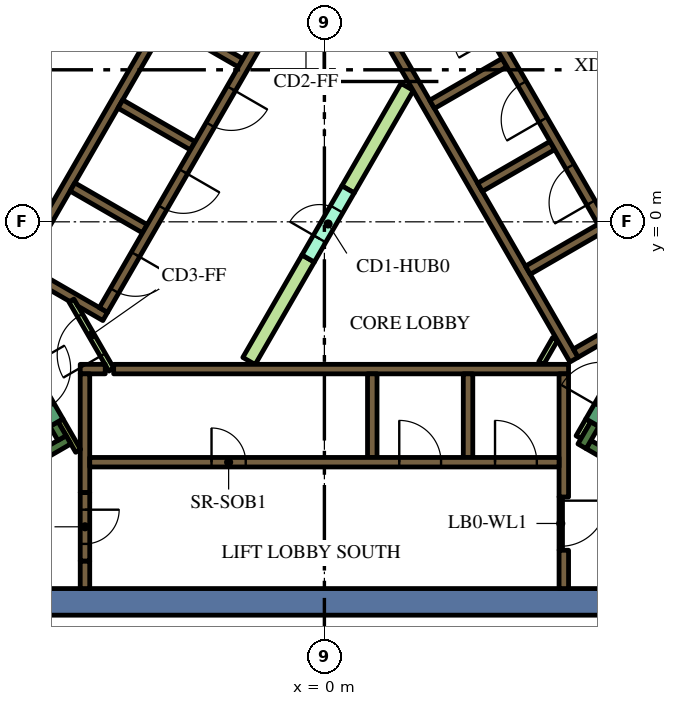
"""IFC4 building model, lengths in metres.
Left out: names, types, materials, properties, quantities, classifications, styles, units other than length and angle.
Written with IfcOpenShell. Run it as: python <this file> out.ifc"""

import sys

from ifc_helpers import new_model, si_unit, direction, frame, frame_2d, origin, place, context, subcontext, project, spatial, polyline, rectangle, outline, extrude, element, fill, save


model = new_model("IFC4")
c1 = context("Model", 3, precision=1e-05, world=origin(), true_north=direction((0.0, 1.0)))
c2 = subcontext(c1, "Body", "Model", "MODEL_VIEW")
j1 = project(units=[si_unit("LENGTHUNIT", "METRE"), si_unit("PLANEANGLEUNIT", "RADIAN")], contexts=[c1])
p1 = place(None, origin())
s1 = spatial("IfcSite", under=j1, at=p1, CompositionType="ELEMENT")
p2 = place(p1, origin())
s2 = spatial("IfcBuilding", under=s1, at=p2, CompositionType="ELEMENT")
p3 = place(p2, frame((0.0, 0.0, 261.6)))
s3 = spatial("IfcBuildingStorey", under=s2, at=p3, CompositionType="ELEMENT", Elevation=261.6)
p4 = place(p3, frame((8.904, -10.0, 0.0), z_axis=(0.0, 0.0, 1.0), x_axis=(-1.0, 0.0, 0.0)))
e1 = element("IfcWall", 1, at=p4, inside=s3, PredefinedType="SOLIDWALL", context=c2, shape_type="SweptSolid", body=[
    extrude(rectangle(XDim=22.226, YDim=0.7, at=frame_2d((11.113, 0.0))), origin(), (0.0, 0.0, 1.0), 5.4),
])
p5 = place(p3, frame((-12.625, -1.867, 0.0), z_axis=(0.0, 0.0, 1.0), x_axis=(0.499996974394, 0.866027150612, 0.0)))
e2 = element("IfcWall", 2, at=p5, inside=s3, PredefinedType="SOLIDWALL", context=c2, shape_type="SweptSolid", body=[
    extrude(rectangle(XDim=15.858, YDim=0.7, at=frame_2d((7.929, 0.0))), origin(), (0.0, 0.0, 1.0), 5.4),
])
p6 = place(p3, frame((12.84, -9.261, 0.0), z_axis=(0.0, 0.0, 1.0), x_axis=(-0.866013990052, 0.500019768644, 0.0)))
e3 = element("IfcWall", 3, at=p6, inside=s3, PredefinedType="SOLIDWALL", context=c2, shape_type="SweptSolid", body=[
    extrude(rectangle(XDim=6.8, YDim=0.25, at=frame_2d((3.4, 0.0))), origin(), (0.0, 0.0, 1.0), 5.4),
])
p7 = place(p3, frame((6.78, -5.906, 0.0), z_axis=(0.0, 0.0, 1.0), x_axis=(0.500223362819, 0.865896406789, 0.0)))
e4 = element("IfcWall", 4, at=p7, inside=s3, PredefinedType="SOLIDWALL", context=c2, shape_type="SweptSolid", body=[
    extrude(rectangle(XDim=0.675, YDim=0.25, at=frame_2d((0.337, 0.0))), origin(), (0.0, 0.0, 1.0), 5.4),
])
p8 = place(p3, frame((-12.84, -9.261, 0.0), z_axis=(0.0, 0.0, 1.0), x_axis=(0.866016039709, 0.500016218704, 0.0)))
e5 = element("IfcWall", 5, at=p8, inside=s3, PredefinedType="SOLIDWALL", context=c2, shape_type="SweptSolid", body=[
    extrude(rectangle(XDim=7.05, YDim=0.25, at=frame_2d((3.525, 0.0))), origin(), (0.0, 0.0, 1.0), 5.4),
])
p9 = place(p3, frame((-6.905, -5.69, 0.0), z_axis=(0.0, 0.0, 1.0), x_axis=(-0.500402024738, 0.865793170242, 0.0)))
e6 = element("IfcWall", 6, at=p9, inside=s3, PredefinedType="SOLIDWALL", context=c2, shape_type="SweptSolid", body=[
    extrude(rectangle(XDim=0.425, YDim=0.25, at=frame_2d((0.212, 0.0))), origin(), (0.0, 0.0, 1.0), 5.4),
])
p10 = place(p3, frame((-5.545, -3.875, 0.0), z_axis=(0.0, 0.0, 1.0), x_axis=(1.0, 0.0, 0.0)))
e7 = element("IfcWall", 7, at=p10, inside=s3, PredefinedType="SOLIDWALL", context=c2, shape_type="SweptSolid", body=[
    extrude(rectangle(XDim=11.97, YDim=0.25, at=frame_2d((5.985, 0.0))), origin(), (0.0, 0.0, 1.0), 5.4),
])
p11 = place(p3, frame((-6.425, -3.875, 0.0), z_axis=(0.0, 0.0, 1.0), x_axis=(1.0, 0.0, 0.0)))
e8 = element("IfcWall", 8, at=p11, inside=s3, PredefinedType="SOLIDWALL", context=c2, shape_type="SweptSolid", body=[
    extrude(rectangle(XDim=0.658, YDim=0.25, at=frame_2d((0.329, 0.0))), origin(), (0.0, 0.0, 1.0), 5.4),
])
p12 = place(p3, frame((6.3, -7.24, 0.0), z_axis=(0.0, 0.0, 1.0), x_axis=(0.0, 1.0, 0.0)))
e9 = element("IfcWall", 9, at=p12, inside=s3, PredefinedType="SOLIDWALL", context=c2, shape_type="SweptSolid", body=[
    extrude(rectangle(XDim=3.24, YDim=0.25, at=frame_2d((1.62, 0.0))), origin(), (0.0, 0.0, 1.0), 5.4),
])
p13 = place(p3, frame((6.3, -9.65, 0.0), z_axis=(0.0, 0.0, 1.0), x_axis=(0.0, 1.0, 0.0)))
e10 = element("IfcWall", 10, at=p13, inside=s3, PredefinedType="SOLIDWALL", context=c2, shape_type="SweptSolid", body=[
    extrude(rectangle(XDim=1.008, YDim=0.25, at=frame_2d((0.504, 0.0))), origin(), (0.0, 0.0, 1.0), 5.4),
])
for number, where, z_axis, x_axis in (
    (11, (3.78, -4.0, 0.0), (0.0, 0.0, 1.0), (0.0, -1.0, 0.0)),
    (12, (1.26, -4.0, 0.0), (0.0, 0.0, 1.0), (0.0, -1.0, 0.0)),
):
    element("IfcWall", number, at=place(p3, frame(where, z_axis=z_axis, x_axis=x_axis)), inside=s3, PredefinedType="SOLIDWALL", context=c2, shape_type="SweptSolid", body=[
        extrude(rectangle(XDim=2.2, YDim=0.25, at=frame_2d((1.1, 0.0))), origin(), (0.0, 0.0, 1.0), 5.4),
    ])
p14 = place(p3, frame((-6.3, -7.125, 0.0), z_axis=(0.0, 0.0, 1.0), x_axis=(0.0, 1.0, 0.0)))
e13 = element("IfcWall", 13, at=p14, inside=s3, PredefinedType="SOLIDWALL", context=c2, shape_type="SweptSolid", body=[
    extrude(rectangle(XDim=3.125, YDim=0.25, at=frame_2d((1.562, 0.0))), origin(), (0.0, 0.0, 1.0), 5.4),
])
p15 = place(p3, frame((-6.3, -8.925, 0.0), z_axis=(0.0, 0.0, 1.0), x_axis=(0.0, -1.0, 0.0)))
e14 = element("IfcWall", 14, at=p15, inside=s3, PredefinedType="SOLIDWALL", context=c2, shape_type="SweptSolid", body=[
    extrude(rectangle(XDim=0.725, YDim=0.25, at=frame_2d((0.363, 0.0))), origin(), (0.0, 0.0, 1.0), 5.4),
])
p16 = place(p3, frame((6.568, -3.627, 0.0), z_axis=(0.0, 0.0, 1.0), x_axis=(-0.499999455981, 0.866025717874, 0.0)))
e15 = element("IfcWall", 15, at=p16, inside=s3, PredefinedType="SOLIDWALL", context=c2, shape_type="SweptSolid", body=[
    extrude(rectangle(XDim=11.978, YDim=0.25, at=frame_2d((5.989, 0.0))), origin(), (0.0, 0.0, 1.0), 5.4),
])
for number, where, z_axis, x_axis in (
    (16, (2.834, 3.091, 0.0), (0.0, 0.0, 1.0), (0.866, 0.5, 0.0)),
    (17, (4.094, 0.909, 0.0), (0.0, 0.0, 1.0), (0.866, 0.5, 0.0)),
    (18, (5.354, -1.274, 0.0), (0.0, 0.0, 1.0), (0.866, 0.5, 0.0)),
):
    element("IfcWall", number, at=place(p3, frame(where, z_axis=z_axis, x_axis=x_axis)), inside=s3, PredefinedType="SOLIDWALL", context=c2, shape_type="SweptSolid", body=[
        extrude(rectangle(XDim=2.2, YDim=0.25, at=frame_2d((1.1, 0.0))), origin(), (0.0, 0.0, 1.0), 5.4),
    ])
p17 = place(p3, frame((6.614, -3.456, 0.0), z_axis=(0.0, 0.0, 1.0), x_axis=(0.866032512851, 0.499987686533, 0.0)))
e19 = element("IfcWall", 19, at=p17, inside=s3, PredefinedType="SOLIDWALL", context=c2, shape_type="SweptSolid", body=[
    extrude(rectangle(XDim=2.975, YDim=0.25, at=frame_2d((1.487, 0.0))), origin(), (0.0, 0.0, 1.0), 5.4),
])
p18 = place(p3, frame((-8.06, -1.311, 0.0), z_axis=(0.0, 0.0, 1.0), x_axis=(0.50000273126, 0.866023826885, 0.0)))
e20 = element("IfcWall", 20, at=p18, inside=s3, PredefinedType="SOLIDWALL", context=c2, shape_type="SweptSolid", body=[
    extrude(rectangle(XDim=10.33, YDim=0.25, at=frame_2d((5.165, 0.0))), origin(), (0.0, 0.0, 1.0), 5.4),
])
for number, where, z_axis, x_axis in (
    (21, (-2.204, 4.182, 0.0), (0.0, 0.0, 1.0), (-0.866, 0.5, 0.0)),
    (22, (-5.369, 3.1, 0.0), (0.0, 0.0, 1.0), (0.866, -0.5, 0.0)),
    (23, (-4.724, -0.182, 0.0), (0.0, 0.0, 1.0), (-0.866, 0.5, 0.0)),
):
    element("IfcWall", number, at=place(p3, frame(where, z_axis=z_axis, x_axis=x_axis)), inside=s3, PredefinedType="SOLIDWALL", context=c2, shape_type="SweptSolid", body=[
        extrude(rectangle(XDim=2.2, YDim=0.25, at=frame_2d((1.1, 0.0))), origin(), (0.0, 0.0, 1.0), 5.4),
    ])
p19 = place(p3, origin())
e24 = element("IfcWall", 24, at=p19, inside=s3, PredefinedType="SOLIDWALL", context=c2, shape_type="SweptSolid", body=[
    extrude(outline(polyline([(-5.922, -2.257), (-5.922, -2.257), (-5.705, -2.382), (-5.83, -2.598), (-6.483, -2.221), (-6.591, -2.033), (-6.591, -2.033), (-6.7, -2.096), (-7.952, -1.373), (-7.827, -1.156), (-5.922, -2.257)])), origin(), (0.0, 0.0, 1.0), 5.4),
])
p20 = place(p3, frame((-6.48, -6.027, 0.0), z_axis=(0.0, 0.0, 1.0), x_axis=(-0.499927229454, 0.866067413802, 0.0)))
e25 = element("IfcWall", 25, at=p20, inside=s3, PredefinedType="PARTITIONING", context=c2, shape_type="SweptSolid", body=[
    extrude(rectangle(XDim=0.929, YDim=0.15, at=frame_2d((0.464, 0.0))), origin(), (0.0, 0.0, 1.0), 5.4),
])
p21 = place(p3, frame((6.945, -5.222, 0.0), z_axis=(0.0, 0.0, 1.0), x_axis=(-0.499818422106, -0.866130212453, 0.0)))
e26 = element("IfcWall", 26, at=p21, inside=s3, PredefinedType="PARTITIONING", context=c2, shape_type="SweptSolid", body=[
    extrude(rectangle(XDim=0.514, YDim=0.15, at=frame_2d((0.257, 0.0))), origin(), (0.0, 0.0, 1.0), 4.75),
])
p22 = place(p3, frame((5.705, -3.718, 0.0), z_axis=(0.0, 0.0, 1.0), x_axis=(0.499962090823, 0.866047289552, 0.0)))
e27 = element("IfcWall", 27, at=p22, inside=s3, PredefinedType="PARTITIONING", context=c2, shape_type="SweptSolid", body=[
    extrude(rectangle(XDim=0.735, YDim=0.15, at=frame_2d((0.367, 0.0))), origin(), (0.0, 0.0, 1.0), 4.75),
])
e28 = element("IfcWall", 28, at=p19, inside=s3, PredefinedType="PARTITIONING", context=c2, shape_type="SweptSolid", body=[
    extrude(outline(polyline([(2.017, 3.643), (2.342, 3.456), (0.785, 0.76), (0.46, 0.947), (2.017, 3.643)])), origin(), (0.0, 0.0, 1.0), 4.75),
])
e29 = element("IfcWall", 29, at=p19, inside=s3, PredefinedType="PARTITIONING", context=c2, shape_type="SweptSolid", body=[
    extrude(outline(polyline([(-0.59, -0.872), (-0.265, -1.059), (-1.822, -3.756), (-2.147, -3.568), (-0.59, -0.872)])), origin(), (0.0, 0.0, 1.0), 4.75),
])
p23 = place(p3, frame((-6.175, -6.325, 0.0), z_axis=(0.0, 0.0, 1.0), x_axis=(1.0, 0.0, 0.0)))
e30 = element("IfcWall", 30, at=p23, inside=s3, PredefinedType="SOLIDWALL", context=c2, shape_type="SweptSolid", body=[
    extrude(rectangle(XDim=12.35, YDim=0.25, at=frame_2d((6.175, 0.0))), origin(), (0.0, 0.0, 1.0), 5.4),
])
p24 = place(p23, frame((3.205, 0.0, 0.0)))
e31 = element("IfcOpeningElement", 31, at=p24, cuts=e30, PredefinedType="OPENING", context=c2, shape_type="SweptSolid", body=[
    extrude(rectangle(XDim=0.9, YDim=2.1, at=frame_2d((0.45, 1.05))), frame((0.0, 0.135, 0.0), z_axis=(0.0, -1.0, 0.0), x_axis=(1.0, 0.0, 0.0)), (0.0, 0.0, 1.0), 0.27),
])
p25 = place(p23, frame((8.145, 0.0, 0.0)))
e32 = element("IfcOpeningElement", 32, at=p25, cuts=e30, PredefinedType="OPENING", context=c2, shape_type="SweptSolid", body=[
    extrude(rectangle(XDim=1.1, YDim=2.1, at=frame_2d((0.55, 1.05))), frame((0.0, 0.135, 0.0), z_axis=(0.0, -1.0, 0.0), x_axis=(1.0, 0.0, 0.0)), (0.0, 0.0, 1.0), 0.27),
])
p26 = place(p23, frame((10.665, 0.0, 0.0)))
e33 = element("IfcOpeningElement", 33, at=p26, cuts=e30, PredefinedType="OPENING", context=c2, shape_type="SweptSolid", body=[
    extrude(rectangle(XDim=1.1, YDim=2.1, at=frame_2d((0.55, 1.05))), frame((0.0, 0.135, 0.0), z_axis=(0.0, -1.0, 0.0), x_axis=(1.0, 0.0, 0.0)), (0.0, 0.0, 1.0), 0.27),
])
p27 = place(p3, frame((8.565, -2.185, 0.0), z_axis=(0.0, 0.0, 1.0), x_axis=(-0.499997954832, 0.866026584559, 0.0)))
e34 = element("IfcWall", 34, at=p27, inside=s3, PredefinedType="SOLIDWALL", context=c2, shape_type="SweptSolid", body=[
    extrude(rectangle(XDim=12.35, YDim=0.25, at=frame_2d((6.175, 0.0))), origin(), (0.0, 0.0, 1.0), 5.4),
])
p28 = place(p27, frame((0.685, 0.0, 0.0)))
e35 = element("IfcOpeningElement", 35, at=p28, cuts=e34, PredefinedType="OPENING", context=c2, shape_type="SweptSolid", body=[
    extrude(rectangle(XDim=0.9, YDim=2.1, at=frame_2d((0.45, 1.05))), frame((0.0, 0.135, 0.0), z_axis=(0.0, -1.0, 0.0), x_axis=(1.0, 0.0, 0.0)), (0.0, 0.0, 1.0), 0.27),
])
p29 = place(p27, frame((3.105, 0.0, 0.0)))
e36 = element("IfcOpeningElement", 36, at=p29, cuts=e34, PredefinedType="OPENING", context=c2, shape_type="SweptSolid", body=[
    extrude(rectangle(XDim=1.1, YDim=2.1, at=frame_2d((0.55, 1.05))), frame((0.0, 0.135, 0.0), z_axis=(0.0, -1.0, 0.0), x_axis=(1.0, 0.0, 0.0)), (0.0, 0.0, 1.0), 0.27),
])
p30 = place(p27, frame((5.625, 0.0, 0.0)))
e37 = element("IfcOpeningElement", 37, at=p30, cuts=e34, PredefinedType="OPENING", context=c2, shape_type="SweptSolid", body=[
    extrude(rectangle(XDim=1.1, YDim=2.1, at=frame_2d((0.55, 1.05))), frame((0.0, 0.135, 0.0), z_axis=(0.0, -1.0, 0.0), x_axis=(1.0, 0.0, 0.0)), (0.0, 0.0, 1.0), 0.27),
])
p31 = place(p27, frame((8.145, 0.0, 0.0)))
e38 = element("IfcOpeningElement", 38, at=p31, cuts=e34, PredefinedType="OPENING", context=c2, shape_type="SweptSolid", body=[
    extrude(rectangle(XDim=1.1, YDim=2.1, at=frame_2d((0.55, 1.05))), frame((0.0, 0.135, 0.0), z_axis=(0.0, -1.0, 0.0), x_axis=(1.0, 0.0, 0.0)), (0.0, 0.0, 1.0), 0.27),
])
p32 = place(p27, frame((10.665, 0.0, 0.0)))
e39 = element("IfcOpeningElement", 39, at=p32, cuts=e34, PredefinedType="OPENING", context=c2, shape_type="SweptSolid", body=[
    extrude(rectangle(XDim=1.1, YDim=2.1, at=frame_2d((0.55, 1.05))), frame((0.0, 0.135, 0.0), z_axis=(0.0, -1.0, 0.0), x_axis=(1.0, 0.0, 0.0)), (0.0, 0.0, 1.0), 0.27),
])
p33 = place(p3, frame((-0.898, 6.194, 0.0), z_axis=(0.0, 0.0, 1.0), x_axis=(-0.499996202215, -0.866027596426, 0.0)))
e40 = element("IfcWall", 40, at=p33, inside=s3, PredefinedType="SOLIDWALL", context=c2, shape_type="SweptSolid", body=[
    extrude(rectangle(XDim=9.83, YDim=0.25, at=frame_2d((4.915, 0.0))), origin(), (0.0, 0.0, 1.0), 5.4),
])
p34 = place(p33, frame((0.585, 0.0, 0.0)))
e41 = element("IfcOpeningElement", 41, at=p34, cuts=e40, PredefinedType="OPENING", context=c2, shape_type="SweptSolid", body=[
    extrude(rectangle(XDim=1.1, YDim=2.1, at=frame_2d((0.55, 1.05))), frame((0.0, 0.135, 0.0), z_axis=(0.0, -1.0, 0.0), x_axis=(1.0, 0.0, 0.0)), (0.0, 0.0, 1.0), 0.27),
])
p35 = place(p33, frame((3.105, 0.0, 0.0)))
e42 = element("IfcOpeningElement", 42, at=p35, cuts=e40, PredefinedType="OPENING", context=c2, shape_type="SweptSolid", body=[
    extrude(rectangle(XDim=1.1, YDim=2.1, at=frame_2d((0.55, 1.05))), frame((0.0, 0.135, 0.0), z_axis=(0.0, -1.0, 0.0), x_axis=(1.0, 0.0, 0.0)), (0.0, 0.0, 1.0), 0.27),
])
p36 = place(p33, frame((5.625, 0.0, 0.0)))
e43 = element("IfcOpeningElement", 43, at=p36, cuts=e40, PredefinedType="OPENING", context=c2, shape_type="SweptSolid", body=[
    extrude(rectangle(XDim=1.1, YDim=2.1, at=frame_2d((0.55, 1.05))), frame((0.0, 0.135, 0.0), z_axis=(0.0, -1.0, 0.0), x_axis=(1.0, 0.0, 0.0)), (0.0, 0.0, 1.0), 0.27),
])
p37 = place(p33, frame((8.145, 0.0, 0.0)))
e44 = element("IfcOpeningElement", 44, at=p37, cuts=e40, PredefinedType="OPENING", context=c2, shape_type="SweptSolid", body=[
    extrude(rectangle(XDim=1.1, YDim=2.1, at=frame_2d((0.55, 1.05))), frame((0.0, 0.135, 0.0), z_axis=(0.0, -1.0, 0.0), x_axis=(1.0, 0.0, 0.0)), (0.0, 0.0, 1.0), 0.27),
])
p38 = place(p3, frame((7.053, -5.284, 0.0), z_axis=(0.0, 0.0, 1.0), x_axis=(0.500078061341, 0.865980330357, 0.0)))
e45 = element("IfcWall", 45, at=p38, inside=s3, PredefinedType="SOLIDWALL", context=c2, shape_type="SweptSolid", body=[
    extrude(rectangle(XDim=2.1, YDim=0.4, at=frame_2d((1.05, 0.0))), origin(), (0.0, 0.0, 1.0), 5.4),
])
p39 = place(p38, frame((0.45, 0.0, 0.0)))
e46 = element("IfcOpeningElement", 46, at=p39, cuts=e45, PredefinedType="OPENING", context=c2, shape_type="SweptSolid", body=[
    extrude(rectangle(XDim=1.2, YDim=2.1, at=frame_2d((0.6, 1.05))), frame((0.0, 0.21, 0.0), z_axis=(0.0, -1.0, 0.0), x_axis=(1.0, 0.0, 0.0)), (0.0, 0.0, 1.0), 0.42),
])
p40 = place(p3, frame((-8.103, -3.466, 0.0), z_axis=(0.0, 0.0, 1.0), x_axis=(0.500078061341, -0.865980330357, 0.0)))
e47 = element("IfcWall", 47, at=p40, inside=s3, PredefinedType="SOLIDWALL", context=c2, shape_type="SweptSolid", body=[
    extrude(rectangle(XDim=2.1, YDim=0.4, at=frame_2d((1.05, 0.0))), origin(), (0.0, 0.0, 1.0), 5.4),
])
p41 = place(p40, frame((0.45, 0.0, 0.0)))
e48 = element("IfcOpeningElement", 48, at=p41, cuts=e47, PredefinedType="OPENING", context=c2, shape_type="SweptSolid", body=[
    extrude(rectangle(XDim=1.2, YDim=2.1, at=frame_2d((0.6, 1.05))), frame((0.0, 0.21, 0.0), z_axis=(0.0, -1.0, 0.0), x_axis=(1.0, 0.0, 0.0)), (0.0, 0.0, 1.0), 0.42),
])
p42 = place(p3, frame((-6.3, -7.125, 0.0), z_axis=(0.0, 0.0, 1.0), x_axis=(0.0, -1.0, 0.0)))
e49 = element("IfcWall", 49, at=p42, inside=s3, PredefinedType="SOLIDWALL", context=c2, shape_type="SweptSolid", body=[
    extrude(rectangle(XDim=1.8, YDim=0.25, at=frame_2d((0.9, 0.0))), origin(), (0.0, 0.0, 1.0), 5.4),
])
p43 = place(p42, frame((0.45, 0.0, 0.0)))
e50 = element("IfcOpeningElement", 50, at=p43, cuts=e49, PredefinedType="OPENING", context=c2, shape_type="SweptSolid", body=[
    extrude(rectangle(XDim=0.9, YDim=2.1, at=frame_2d((0.45, 1.05))), frame((0.0, 0.135, 0.0), z_axis=(0.0, -1.0, 0.0), x_axis=(1.0, 0.0, 0.0)), (0.0, 0.0, 1.0), 0.27),
])
p44 = place(p3, frame((-0.427, -0.966, 0.0), z_axis=(0.0, 0.0, 1.0), x_axis=(0.49994051562, 0.866059744384, 0.0)))
e51 = element("IfcWall", 51, at=p44, inside=s3, PredefinedType="PARTITIONING", context=c2, shape_type="SweptSolid", body=[
    extrude(rectangle(XDim=2.1, YDim=0.375, at=frame_2d((1.05, 0.0))), origin(), (0.0, 0.0, 1.0), 4.75),
])
p45 = place(p44, frame((0.6, 0.0, 0.0)))
e52 = element("IfcOpeningElement", 52, at=p45, cuts=e51, PredefinedType="OPENING", context=c2, shape_type="SweptSolid", body=[
    extrude(rectangle(XDim=0.9, YDim=2.1, at=frame_2d((0.45, 1.05))), frame((0.0, 0.198, 0.0), z_axis=(0.0, -1.0, 0.0), x_axis=(1.0, 0.0, 0.0)), (0.0, 0.0, 1.0), 0.395),
])
p46 = place(p3, frame((-5.606, -3.89, 0.0), z_axis=(0.0, 0.0, 1.0), x_axis=(-0.500027713859, 0.866009402589, 0.0)))
e53 = element("IfcWall", 53, at=p46, inside=s3, PredefinedType="PARTITIONING", context=c2, shape_type="SweptSolid", body=[
    extrude(rectangle(XDim=2.1, YDim=0.15, at=frame_2d((1.05, 0.0))), origin(), (0.0, 0.0, 1.0), 4.75),
])
p47 = place(p46, frame((0.45, 0.0, 0.0)))
e54 = element("IfcOpeningElement", 54, at=p47, cuts=e53, PredefinedType="OPENING", context=c2, shape_type="SweptSolid", body=[
    extrude(rectangle(XDim=1.2, YDim=2.1, at=frame_2d((0.6, 1.05))), frame((0.0, 0.085, 0.0), z_axis=(0.0, -1.0, 0.0), x_axis=(1.0, 0.0, 0.0)), (0.0, 0.0, 1.0), 0.17),
])
p48 = place(p3, frame((6.22, -7.237, 0.0), z_axis=(0.0, 0.0, 1.0), x_axis=(0.0, -1.0, 0.0)))
e55 = element("IfcWall", 55, at=p48, inside=s3, PredefinedType="PARTITIONING", context=c2, shape_type="SweptSolid", body=[
    extrude(rectangle(XDim=1.4, YDim=0.09, at=frame_2d((0.7, 0.0))), origin(), (0.0, 0.0, 1.0), 4.75),
])
p49 = place(p48, frame((0.1, 0.0, 0.0)))
e56 = element("IfcOpeningElement", 56, at=p49, cuts=e55, PredefinedType="OPENING", context=c2, shape_type="SweptSolid", body=[
    extrude(rectangle(XDim=1.2, YDim=2.1, at=frame_2d((0.6, 1.05))), frame((0.0, 0.055, 0.0), z_axis=(0.0, -1.0, 0.0), x_axis=(1.0, 0.0, 0.0)), (0.0, 0.0, 1.0), 0.11),
])
p50 = place(p24, origin())
e57 = element("IfcDoor", 57, at=p50, inside=s3, OperationType="SINGLE_SWING_LEFT", PredefinedType="DOOR", context=c2, shape_type="SweptSolid", body=[
    extrude(rectangle(XDim=0.9, YDim=2.1, at=frame_2d((0.45, 1.05))), frame((0.0, 0.025, 0.0), z_axis=(0.0, -1.0, 0.0), x_axis=(1.0, 0.0, 0.0)), (0.0, 0.0, 1.0), 0.05),
])
fill(e31, e57)
p51 = place(p25, origin())
e58 = element("IfcDoor", 58, at=p51, inside=s3, OperationType="DOUBLE_DOOR_SLIDING", PredefinedType="DOOR", context=c2, shape_type="SweptSolid", body=[
    extrude(rectangle(XDim=1.1, YDim=2.1, at=frame_2d((0.55, 1.05))), frame((0.0, 0.025, 0.0), z_axis=(0.0, -1.0, 0.0), x_axis=(1.0, 0.0, 0.0)), (0.0, 0.0, 1.0), 0.05),
])
fill(e32, e58)
p52 = place(p26, origin())
e59 = element("IfcDoor", 59, at=p52, inside=s3, OperationType="DOUBLE_DOOR_SLIDING", PredefinedType="DOOR", context=c2, shape_type="SweptSolid", body=[
    extrude(rectangle(XDim=1.1, YDim=2.1, at=frame_2d((0.55, 1.05))), frame((0.0, 0.025, 0.0), z_axis=(0.0, -1.0, 0.0), x_axis=(1.0, 0.0, 0.0)), (0.0, 0.0, 1.0), 0.05),
])
fill(e33, e59)
p53 = place(p29, origin())
e60 = element("IfcDoor", 60, at=p53, inside=s3, OperationType="DOUBLE_DOOR_SLIDING", PredefinedType="DOOR", context=c2, shape_type="SweptSolid", body=[
    extrude(rectangle(XDim=1.1, YDim=2.1, at=frame_2d((0.55, 1.05))), frame((0.0, 0.025, 0.0), z_axis=(0.0, -1.0, 0.0), x_axis=(1.0, 0.0, 0.0)), (0.0, 0.0, 1.0), 0.05),
])
fill(e36, e60)
p54 = place(p30, origin())
e61 = element("IfcDoor", 61, at=p54, inside=s3, OperationType="DOUBLE_DOOR_SLIDING", PredefinedType="DOOR", context=c2, shape_type="SweptSolid", body=[
    extrude(rectangle(XDim=1.1, YDim=2.1, at=frame_2d((0.55, 1.05))), frame((0.0, 0.025, 0.0), z_axis=(0.0, -1.0, 0.0), x_axis=(1.0, 0.0, 0.0)), (0.0, 0.0, 1.0), 0.05),
])
fill(e37, e61)
p55 = place(p35, origin())
e62 = element("IfcDoor", 62, at=p55, inside=s3, OperationType="DOUBLE_DOOR_SLIDING", PredefinedType="DOOR", context=c2, shape_type="SweptSolid", body=[
    extrude(rectangle(XDim=1.1, YDim=2.1, at=frame_2d((0.55, 1.05))), frame((0.0, 0.025, 0.0), z_axis=(0.0, -1.0, 0.0), x_axis=(1.0, 0.0, 0.0)), (0.0, 0.0, 1.0), 0.05),
])
fill(e42, e62)
p56 = place(p36, origin())
e63 = element("IfcDoor", 63, at=p56, inside=s3, OperationType="DOUBLE_DOOR_SLIDING", PredefinedType="DOOR", context=c2, shape_type="SweptSolid", body=[
    extrude(rectangle(XDim=1.1, YDim=2.1, at=frame_2d((0.55, 1.05))), frame((0.0, 0.025, 0.0), z_axis=(0.0, -1.0, 0.0), x_axis=(1.0, 0.0, 0.0)), (0.0, 0.0, 1.0), 0.05),
])
fill(e43, e63)
p57 = place(p37, origin())
e64 = element("IfcDoor", 64, at=p57, inside=s3, OperationType="DOUBLE_DOOR_SLIDING", PredefinedType="DOOR", context=c2, shape_type="SweptSolid", body=[
    extrude(rectangle(XDim=1.1, YDim=2.1, at=frame_2d((0.55, 1.05))), frame((0.0, 0.025, 0.0), z_axis=(0.0, -1.0, 0.0), x_axis=(1.0, 0.0, 0.0)), (0.0, 0.0, 1.0), 0.05),
])
fill(e44, e64)
p58 = place(p43, origin())
e65 = element("IfcDoor", 65, at=p58, inside=s3, OperationType="SINGLE_SWING_LEFT", PredefinedType="DOOR", context=c2, shape_type="SweptSolid", body=[
    extrude(rectangle(XDim=0.9, YDim=2.1, at=frame_2d((0.45, 1.05))), frame((0.0, 0.025, 0.0), z_axis=(0.0, -1.0, 0.0), x_axis=(1.0, 0.0, 0.0)), (0.0, 0.0, 1.0), 0.05),
])
fill(e50, e65)
p59 = place(p45, origin())
e66 = element("IfcDoor", 66, at=p59, inside=s3, OperationType="SINGLE_SWING_LEFT", PredefinedType="DOOR", context=c2, shape_type="SweptSolid", body=[
    extrude(rectangle(XDim=0.9, YDim=2.1, at=frame_2d((0.45, 1.05))), frame((0.0, 0.025, 0.0), z_axis=(0.0, -1.0, 0.0), x_axis=(1.0, 0.0, 0.0)), (0.0, 0.0, 1.0), 0.05),
])
fill(e52, e66)
p60 = place(p47, origin())
e67 = element("IfcDoor", 67, at=p60, inside=s3, OperationType="SINGLE_SWING_LEFT", PredefinedType="DOOR", context=c2, shape_type="SweptSolid", body=[
    extrude(rectangle(XDim=1.2, YDim=2.1, at=frame_2d((0.6, 1.05))), frame((0.0, 0.025, 0.0), z_axis=(0.0, -1.0, 0.0), x_axis=(1.0, 0.0, 0.0)), (0.0, 0.0, 1.0), 0.05),
])
fill(e54, e67)
p61 = place(p49, origin())
e68 = element("IfcDoor", 68, at=p61, inside=s3, OperationType="SINGLE_SWING_LEFT", PredefinedType="DOOR", context=c2, shape_type="SweptSolid", body=[
    extrude(rectangle(XDim=1.2, YDim=2.1, at=frame_2d((0.6, 1.05))), frame((0.0, 0.025, 0.0), z_axis=(0.0, -1.0, 0.0), x_axis=(1.0, 0.0, 0.0)), (0.0, 0.0, 1.0), 0.05),
])
fill(e56, e68)
save(model, sys.argv[1])
